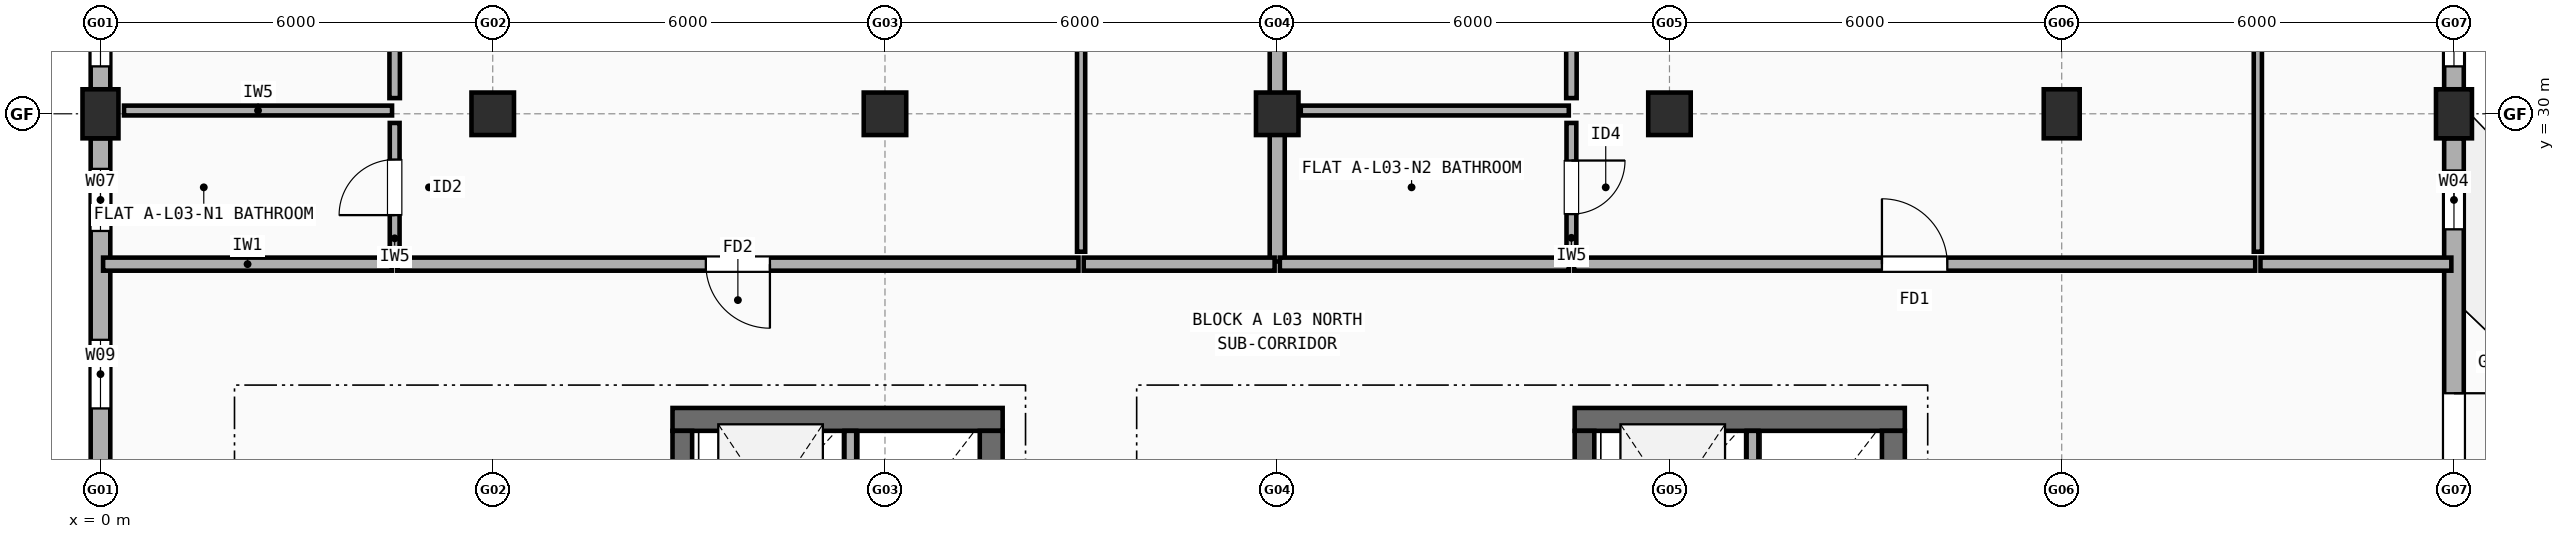
"""IFC4 building model, lengths in metres.
Left out: names, types, materials, properties, quantities, classifications, styles, units other than length and angle.
Written with IfcOpenShell. Run it as: python <this file> out.ifc"""

import sys

from ifc_helpers import new_model, si_unit, direction, frame, frame_2d, origin, origin_2d, place, context, subcontext, project, spatial, rectangle, extrude, element, fill, save


model = new_model("IFC4")
c1 = context("Model", 3, precision=1e-05, world=origin(), true_north=direction((0.0, 1.0)))
c2 = subcontext(c1, "Body", "Model", "MODEL_VIEW")
j1 = project(units=[si_unit("LENGTHUNIT", "METRE"), si_unit("PLANEANGLEUNIT", "RADIAN")], contexts=[c1])
p1 = place(None, origin())
s1 = spatial("IfcSite", under=j1, at=p1, CompositionType="ELEMENT")
p2 = place(p1, origin())
s2 = spatial("IfcBuilding", under=s1, at=p2, CompositionType="ELEMENT")
p3 = place(p2, frame((0.0, 0.0, 10.9)))
s3 = spatial("IfcBuildingStorey", under=s2, at=p3, CompositionType="ELEMENT", Elevation=10.9)
p4 = place(p3, frame((0.0, 30.0, 0.0), z_axis=(0.0, 0.0, 1.0), x_axis=(1.0, 0.0, 0.0)))
e1 = element("IfcColumn", 1, at=p4, inside=s3, PredefinedType="COLUMN", context=c2, shape_type="SweptSolid", body=[
    extrude(rectangle(XDim=0.55, YDim=0.75, at=origin_2d()), origin(), (0.0, 0.0, 1.0), 2.96),
])
for number, where, z_axis, x_axis in (
    (2, (6.0, 30.0, 0.0), (0.0, 0.0, 1.0), (1.0, 0.0, 0.0)),
    (3, (12.0, 30.0, 0.0), (0.0, 0.0, 1.0), (1.0, 0.0, 0.0)),
    (4, (18.0, 30.0, 0.0), (0.0, 0.0, 1.0), (1.0, 0.0, 0.0)),
    (5, (24.0, 30.0, 0.0), (0.0, 0.0, 1.0), (1.0, 0.0, 0.0)),
):
    element("IfcColumn", number, at=place(p3, frame(where, z_axis=z_axis, x_axis=x_axis)), inside=s3, PredefinedType="COLUMN", context=c2, shape_type="SweptSolid", body=[
        extrude(rectangle(XDim=0.65, YDim=0.65, at=origin_2d()), origin(), (0.0, 0.0, 1.0), 2.96),
    ])
for number, where, z_axis, x_axis in (
    (6, (30.0, 30.0, 0.0), (0.0, 0.0, 1.0), (1.0, 0.0, 0.0)),
    (7, (36.0, 30.0, 0.0), (0.0, 0.0, 1.0), (1.0, 0.0, 0.0)),
):
    element("IfcColumn", number, at=place(p3, frame(where, z_axis=z_axis, x_axis=x_axis)), inside=s3, PredefinedType="COLUMN", context=c2, shape_type="SweptSolid", body=[
        extrude(rectangle(XDim=0.55, YDim=0.75, at=origin_2d()), origin(), (0.0, 0.0, 1.0), 2.96),
    ])
p5 = place(p3, frame((36.0, 24.375, 0.0), z_axis=(0.0, 0.0, 1.0), x_axis=(0.0, 1.0, 0.0)))
e8 = element("IfcWall", 8, at=p5, inside=s3, PredefinedType="STANDARD", context=c2, shape_type="SweptSolid", body=[
    extrude(rectangle(XDim=5.25, YDim=0.3, at=frame_2d((2.625, 0.0))), origin(), (0.0, 0.0, 1.0), 2.442),
])
p6 = place(p5, frame((0.2, 0.0, 0.0)))
e9 = element("IfcOpeningElement", 9, at=p6, cuts=e8, PredefinedType="OPENING", context=c2, shape_type="SweptSolid", body=[
    extrude(rectangle(XDim=1.15, YDim=2.15, at=frame_2d((0.575, 1.075))), frame((0.0, 0.16, 0.0), z_axis=(0.0, -1.0, 0.0), x_axis=(1.0, 0.0, 0.0)), (0.0, 0.0, 1.0), 0.32),
])
p7 = place(p5, frame((3.857, 0.0, 0.9)))
e10 = element("IfcOpeningElement", 10, at=p7, cuts=e8, PredefinedType="OPENING", context=c2, shape_type="SweptSolid", body=[
    extrude(rectangle(XDim=0.9, YDim=1.3, at=frame_2d((0.45, 0.65))), frame((0.0, 0.16, 0.0), z_axis=(0.0, -1.0, 0.0), x_axis=(1.0, 0.0, 0.0)), (0.0, 0.0, 1.0), 0.32),
])
p8 = place(p3, frame((36.0, 30.375, 0.0), z_axis=(0.0, 0.0, 1.0), x_axis=(0.0, 1.0, 0.0)))
e11 = element("IfcWall", 11, at=p8, inside=s3, PredefinedType="STANDARD", context=c2, shape_type="SweptSolid", body=[
    extrude(rectangle(XDim=5.25, YDim=0.3, at=frame_2d((2.625, 0.0))), origin(), (0.0, 0.0, 1.0), 2.442),
])
p9 = place(p8, frame((0.35, 0.0, 0.9)))
e12 = element("IfcOpeningElement", 12, at=p9, cuts=e11, PredefinedType="OPENING", context=c2, shape_type="SweptSolid", body=[
    extrude(rectangle(XDim=0.95, YDim=1.35, at=frame_2d((0.475, 0.675))), frame((0.0, 0.16, 0.0), z_axis=(0.0, -1.0, 0.0), x_axis=(1.0, 0.0, 0.0)), (0.0, 0.0, 1.0), 0.32),
])
p10 = place(p8, frame((3.95, 0.0, 0.9)))
e13 = element("IfcOpeningElement", 13, at=p10, cuts=e11, PredefinedType="OPENING", context=c2, shape_type="SweptSolid", body=[
    extrude(rectangle(XDim=0.95, YDim=1.35, at=frame_2d((0.475, 0.675))), frame((0.0, 0.16, 0.0), z_axis=(0.0, -1.0, 0.0), x_axis=(1.0, 0.0, 0.0)), (0.0, 0.0, 1.0), 0.32),
])
p11 = place(p3, frame((0.0, 35.625, 0.0), z_axis=(0.0, 0.0, 1.0), x_axis=(0.0, -1.0, 0.0)))
e14 = element("IfcWall", 14, at=p11, inside=s3, PredefinedType="STANDARD", context=c2, shape_type="SweptSolid", body=[
    extrude(rectangle(XDim=5.25, YDim=0.3, at=frame_2d((2.625, 0.0))), origin(), (0.0, 0.0, 1.0), 2.442),
])
p12 = place(p11, frame((0.35, 0.0, 0.9)))
e15 = element("IfcOpeningElement", 15, at=p12, cuts=e14, PredefinedType="OPENING", context=c2, shape_type="SweptSolid", body=[
    extrude(rectangle(XDim=0.85, YDim=1.25, at=frame_2d((0.425, 0.625))), frame((0.0, 0.16, 0.0), z_axis=(0.0, -1.0, 0.0), x_axis=(1.0, 0.0, 0.0)), (0.0, 0.0, 1.0), 0.32),
])
p13 = place(p11, frame((4.05, 0.0, 0.9)))
e16 = element("IfcOpeningElement", 16, at=p13, cuts=e14, PredefinedType="OPENING", context=c2, shape_type="SweptSolid", body=[
    extrude(rectangle(XDim=0.85, YDim=1.25, at=frame_2d((0.425, 0.625))), frame((0.0, 0.16, 0.0), z_axis=(0.0, -1.0, 0.0), x_axis=(1.0, 0.0, 0.0)), (0.0, 0.0, 1.0), 0.32),
])
p14 = place(p3, frame((0.0, 29.625, 0.0), z_axis=(0.0, 0.0, 1.0), x_axis=(0.0, -1.0, 0.0)))
e17 = element("IfcWall", 17, at=p14, inside=s3, PredefinedType="STANDARD", context=c2, shape_type="SweptSolid", body=[
    extrude(rectangle(XDim=5.25, YDim=0.3, at=frame_2d((2.625, 0.0))), origin(), (0.0, 0.0, 1.0), 2.442),
])
p15 = place(p14, frame((0.468, 0.0, 0.9)))
e18 = element("IfcOpeningElement", 18, at=p15, cuts=e17, PredefinedType="OPENING", context=c2, shape_type="SweptSolid", body=[
    extrude(rectangle(XDim=0.95, YDim=1.35, at=frame_2d((0.475, 0.675))), frame((0.0, 0.16, 0.0), z_axis=(0.0, -1.0, 0.0), x_axis=(1.0, 0.0, 0.0)), (0.0, 0.0, 1.0), 0.32),
])
p16 = place(p14, frame((3.083, 0.0, 0.9)))
e19 = element("IfcOpeningElement", 19, at=p16, cuts=e17, PredefinedType="OPENING", context=c2, shape_type="SweptSolid", body=[
    extrude(rectangle(XDim=1.05, YDim=1.35, at=frame_2d((0.525, 0.675))), frame((0.0, 0.16, 0.0), z_axis=(0.0, -1.0, 0.0), x_axis=(1.0, 0.0, 0.0)), (0.0, 0.0, 1.0), 0.32),
])
p17 = place(p3, frame((13.8, 25.325, 0.0), z_axis=(0.0, 0.0, 1.0), x_axis=(-1.0, 0.0, 0.0)))
e20 = element("IfcWall", 20, at=p17, inside=s3, PredefinedType="SHEAR", context=c2, shape_type="SweptSolid", body=[
    extrude(rectangle(XDim=5.05, YDim=0.35, at=frame_2d((2.525, 0.0))), origin(), (0.0, 0.0, 1.0), 2.96),
])
p18 = place(p3, frame((13.625, 18.75, 0.0), z_axis=(0.0, 0.0, 1.0), x_axis=(0.0, 1.0, 0.0)))
e21 = element("IfcWall", 21, at=p18, inside=s3, PredefinedType="SHEAR", context=c2, shape_type="SweptSolid", body=[
    extrude(rectangle(XDim=6.4, YDim=0.35, at=frame_2d((3.2, 0.0))), origin(), (0.0, 0.0, 1.0), 2.96),
])
p19 = place(p3, frame((8.9, 21.8, 0.0), z_axis=(0.0, 0.0, 1.0), x_axis=(0.0, 1.0, 0.0)))
e22 = element("IfcWall", 22, at=p19, inside=s3, PredefinedType="SHEAR", context=c2, shape_type="SweptSolid", body=[
    extrude(rectangle(XDim=3.35, YDim=0.3, at=frame_2d((1.675, 0.0))), origin(), (0.0, 0.0, 1.0), 2.96),
])
p20 = place(p3, frame((11.47, 22.94, 0.0), z_axis=(0.0, 0.0, 1.0), x_axis=(0.0, 1.0, 0.0)))
e23 = element("IfcWall", 23, at=p20, inside=s3, PredefinedType="SOLIDWALL", context=c2, shape_type="SweptSolid", body=[
    extrude(rectangle(XDim=2.21, YDim=0.18, at=frame_2d((1.105, 0.0))), origin(), (0.0, 0.0, 1.0), 2.96),
])
p21 = place(p3, frame((27.6, 25.325, 0.0), z_axis=(0.0, 0.0, 1.0), x_axis=(-1.0, 0.0, 0.0)))
e24 = element("IfcWall", 24, at=p21, inside=s3, PredefinedType="SHEAR", context=c2, shape_type="SweptSolid", body=[
    extrude(rectangle(XDim=5.05, YDim=0.35, at=frame_2d((2.525, 0.0))), origin(), (0.0, 0.0, 1.0), 2.96),
])
p22 = place(p3, frame((27.425, 18.75, 0.0), z_axis=(0.0, 0.0, 1.0), x_axis=(0.0, 1.0, 0.0)))
e25 = element("IfcWall", 25, at=p22, inside=s3, PredefinedType="SHEAR", context=c2, shape_type="SweptSolid", body=[
    extrude(rectangle(XDim=6.4, YDim=0.35, at=frame_2d((3.2, 0.0))), origin(), (0.0, 0.0, 1.0), 2.96),
])
p23 = place(p3, frame((22.7, 21.8, 0.0), z_axis=(0.0, 0.0, 1.0), x_axis=(0.0, 1.0, 0.0)))
e26 = element("IfcWall", 26, at=p23, inside=s3, PredefinedType="SHEAR", context=c2, shape_type="SweptSolid", body=[
    extrude(rectangle(XDim=3.35, YDim=0.3, at=frame_2d((1.675, 0.0))), origin(), (0.0, 0.0, 1.0), 2.96),
])
p24 = place(p3, frame((25.27, 22.94, 0.0), z_axis=(0.0, 0.0, 1.0), x_axis=(0.0, 1.0, 0.0)))
e27 = element("IfcWall", 27, at=p24, inside=s3, PredefinedType="SOLIDWALL", context=c2, shape_type="SweptSolid", body=[
    extrude(rectangle(XDim=2.21, YDim=0.18, at=frame_2d((1.105, 0.0))), origin(), (0.0, 0.0, 1.0), 2.96),
])
p25 = place(p3, frame((18.0, 27.74, 0.0), z_axis=(0.0, 0.0, 1.0), x_axis=(0.0, 1.0, 0.0)))
e28 = element("IfcWall", 28, at=p25, inside=s3, PredefinedType="SOLIDWALL", context=c2, shape_type="SweptSolid", body=[
    extrude(rectangle(XDim=13.87, YDim=0.23, at=frame_2d((6.935, 0.0))), origin(), (0.0, 0.0, 1.0), 2.458),
])
p26 = place(p3, frame((0.04, 27.7, 0.0), z_axis=(0.0, 0.0, 1.0), x_axis=(1.0, 0.0, 0.0)))
e29 = element("IfcWall", 29, at=p26, inside=s3, PredefinedType="SOLIDWALL", context=c2, shape_type="SweptSolid", body=[
    extrude(rectangle(XDim=4.42, YDim=0.2, at=frame_2d((2.21, 0.0))), origin(), (0.0, 0.0, 1.0), 2.442),
])
p27 = place(p3, frame((4.54, 27.7, 0.0), z_axis=(0.0, 0.0, 1.0), x_axis=(1.0, 0.0, 0.0)))
e30 = element("IfcWall", 30, at=p27, inside=s3, PredefinedType="SOLIDWALL", context=c2, shape_type="SweptSolid", body=[
    extrude(rectangle(XDim=10.42, YDim=0.2, at=frame_2d((5.21, 0.0))), origin(), (0.0, 0.0, 1.0), 2.508),
])
p28 = place(p27, frame((4.72, 0.0, 0.0)))
e31 = element("IfcOpeningElement", 31, at=p28, cuts=e30, PredefinedType="OPENING", context=c2, shape_type="SweptSolid", body=[
    extrude(rectangle(XDim=0.98, YDim=2.15, at=frame_2d((0.49, 1.075))), frame((0.0, 0.11, 0.0), z_axis=(0.0, -1.0, 0.0), x_axis=(1.0, 0.0, 0.0)), (0.0, 0.0, 1.0), 0.22),
])
p29 = place(p3, frame((4.5, 30.24, 0.0), z_axis=(0.0, 0.0, 1.0), x_axis=(0.0, 1.0, 0.0)))
e32 = element("IfcWall", 32, at=p29, inside=s3, PredefinedType="PLUMBINGWALL", context=c2, shape_type="SweptSolid", body=[
    extrude(rectangle(XDim=7.37, YDim=0.16, at=frame_2d((3.685, 0.0))), origin(), (0.0, 0.0, 1.0), 2.442),
])
p30 = place(p29, frame((3.235, 0.0, 0.0)))
e33 = element("IfcOpeningElement", 33, at=p30, cuts=e32, PredefinedType="OPENING", context=c2, shape_type="SweptSolid", body=[
    extrude(rectangle(XDim=0.9, YDim=2.1, at=frame_2d((0.45, 1.05))), frame((0.0, 0.09, 0.0), z_axis=(0.0, -1.0, 0.0), x_axis=(1.0, 0.0, 0.0)), (0.0, 0.0, 1.0), 0.18),
])
p31 = place(p3, frame((4.5, 27.89, 0.0), z_axis=(0.0, 0.0, 1.0), x_axis=(0.0, 1.0, 0.0)))
e34 = element("IfcWall", 34, at=p31, inside=s3, PredefinedType="PARTITIONING", context=c2, shape_type="SweptSolid", body=[
    extrude(rectangle(XDim=1.97, YDim=0.15, at=frame_2d((0.985, 0.0))), origin(), (0.0, 0.0, 1.0), 2.96),
])
p32 = place(p31, frame((0.56, 0.0, 0.0)))
e35 = element("IfcOpeningElement", 35, at=p32, cuts=e34, PredefinedType="OPENING", context=c2, shape_type="SweptSolid", body=[
    extrude(rectangle(XDim=0.85, YDim=2.1, at=frame_2d((0.425, 1.05))), frame((0.0, 0.085, 0.0), z_axis=(0.0, -1.0, 0.0), x_axis=(1.0, 0.0, 0.0)), (0.0, 0.0, 1.0), 0.17),
])
p33 = place(p3, frame((0.36, 30.05, 0.0), z_axis=(0.0, 0.0, 1.0), x_axis=(1.0, 0.0, 0.0)))
e36 = element("IfcWall", 36, at=p33, inside=s3, PredefinedType="PARTITIONING", context=c2, shape_type="SweptSolid", body=[
    extrude(rectangle(XDim=4.1, YDim=0.15, at=frame_2d((2.05, 0.0))), origin(), (0.0, 0.0, 1.0), 2.442),
])
p34 = place(p3, frame((15.04, 27.7, 0.0), z_axis=(0.0, 0.0, 1.0), x_axis=(1.0, 0.0, 0.0)))
e37 = element("IfcWall", 37, at=p34, inside=s3, PredefinedType="SOLIDWALL", context=c2, shape_type="SweptSolid", body=[
    extrude(rectangle(XDim=2.92, YDim=0.2, at=frame_2d((1.46, 0.0))), origin(), (0.0, 0.0, 1.0), 2.96),
])
p35 = place(p3, frame((15.0, 27.89, 0.0), z_axis=(0.0, 0.0, 1.0), x_axis=(0.0, 1.0, 0.0)))
e38 = element("IfcWall", 38, at=p35, inside=s3, PredefinedType="PARTITIONING", context=c2, shape_type="SweptSolid", body=[
    extrude(rectangle(XDim=13.92, YDim=0.125, at=frame_2d((6.96, 0.0))), origin(), (0.0, 0.0, 1.0), 2.442),
])
p36 = place(p35, frame((6.65, 0.0, 0.0)))
e39 = element("IfcOpeningElement", 39, at=p36, cuts=e38, PredefinedType="OPENING", context=c2, shape_type="SweptSolid", body=[
    extrude(rectangle(XDim=0.9, YDim=2.1, at=frame_2d((0.45, 1.05))), frame((0.0, 0.073, 0.0), z_axis=(0.0, -1.0, 0.0), x_axis=(1.0, 0.0, 0.0)), (0.0, 0.0, 1.0), 0.145),
])
p37 = place(p3, frame((18.04, 27.7, 0.0), z_axis=(0.0, 0.0, 1.0), x_axis=(1.0, 0.0, 0.0)))
e40 = element("IfcWall", 40, at=p37, inside=s3, PredefinedType="SOLIDWALL", context=c2, shape_type="SweptSolid", body=[
    extrude(rectangle(XDim=4.42, YDim=0.2, at=frame_2d((2.21, 0.0))), origin(), (0.0, 0.0, 1.0), 2.96),
])
p38 = place(p3, frame((22.54, 27.7, 0.0), z_axis=(0.0, 0.0, 1.0), x_axis=(1.0, 0.0, 0.0)))
e41 = element("IfcWall", 41, at=p38, inside=s3, PredefinedType="SOLIDWALL", context=c2, shape_type="SweptSolid", body=[
    extrude(rectangle(XDim=10.42, YDim=0.2, at=frame_2d((5.21, 0.0))), origin(), (0.0, 0.0, 1.0), 2.442),
])
p39 = place(p38, frame((4.71, 0.0, 0.0)))
e42 = element("IfcOpeningElement", 42, at=p39, cuts=e41, PredefinedType="OPENING", context=c2, shape_type="SweptSolid", body=[
    extrude(rectangle(XDim=1.0, YDim=2.15, at=frame_2d((0.5, 1.075))), frame((0.0, 0.11, 0.0), z_axis=(0.0, -1.0, 0.0), x_axis=(1.0, 0.0, 0.0)), (0.0, 0.0, 1.0), 0.22),
])
p40 = place(p3, frame((22.5, 30.24, 0.0), z_axis=(0.0, 0.0, 1.0), x_axis=(0.0, 1.0, 0.0)))
e43 = element("IfcWall", 43, at=p40, inside=s3, PredefinedType="PLUMBINGWALL", context=c2, shape_type="SweptSolid", body=[
    extrude(rectangle(XDim=7.37, YDim=0.16, at=frame_2d((3.685, 0.0))), origin(), (0.0, 0.0, 1.0), 2.442),
])
p41 = place(p40, frame((3.245, 0.0, 0.0)))
e44 = element("IfcOpeningElement", 44, at=p41, cuts=e43, PredefinedType="OPENING", context=c2, shape_type="SweptSolid", body=[
    extrude(rectangle(XDim=0.88, YDim=2.1, at=frame_2d((0.44, 1.05))), frame((0.0, 0.09, 0.0), z_axis=(0.0, -1.0, 0.0), x_axis=(1.0, 0.0, 0.0)), (0.0, 0.0, 1.0), 0.18),
])
p42 = place(p3, frame((22.5, 27.89, 0.0), z_axis=(0.0, 0.0, 1.0), x_axis=(0.0, 1.0, 0.0)))
e45 = element("IfcWall", 45, at=p42, inside=s3, PredefinedType="PARTITIONING", context=c2, shape_type="SweptSolid", body=[
    extrude(rectangle(XDim=1.97, YDim=0.15, at=frame_2d((0.985, 0.0))), origin(), (0.0, 0.0, 1.0), 2.96),
])
p43 = place(p42, frame((0.575, 0.0, 0.0)))
e46 = element("IfcOpeningElement", 46, at=p43, cuts=e45, PredefinedType="OPENING", context=c2, shape_type="SweptSolid", body=[
    extrude(rectangle(XDim=0.82, YDim=2.08, at=frame_2d((0.41, 1.04))), frame((0.0, 0.085, 0.0), z_axis=(0.0, -1.0, 0.0), x_axis=(1.0, 0.0, 0.0)), (0.0, 0.0, 1.0), 0.17),
])
p44 = place(p3, frame((18.36, 30.05, 0.0), z_axis=(0.0, 0.0, 1.0), x_axis=(1.0, 0.0, 0.0)))
e47 = element("IfcWall", 47, at=p44, inside=s3, PredefinedType="PARTITIONING", context=c2, shape_type="SweptSolid", body=[
    extrude(rectangle(XDim=4.1, YDim=0.15, at=frame_2d((2.05, 0.0))), origin(), (0.0, 0.0, 1.0), 2.442),
])
p45 = place(p3, frame((33.04, 27.7, 0.0), z_axis=(0.0, 0.0, 1.0), x_axis=(1.0, 0.0, 0.0)))
e48 = element("IfcWall", 48, at=p45, inside=s3, PredefinedType="SOLIDWALL", context=c2, shape_type="SweptSolid", body=[
    extrude(rectangle(XDim=2.92, YDim=0.2, at=frame_2d((1.46, 0.0))), origin(), (0.0, 0.0, 1.0), 2.442),
])
p46 = place(p3, frame((33.0, 27.89, 0.0), z_axis=(0.0, 0.0, 1.0), x_axis=(0.0, 1.0, 0.0)))
e49 = element("IfcWall", 49, at=p46, inside=s3, PredefinedType="PARTITIONING", context=c2, shape_type="SweptSolid", body=[
    extrude(rectangle(XDim=13.92, YDim=0.125, at=frame_2d((6.96, 0.0))), origin(), (0.0, 0.0, 1.0), 2.442),
])
p47 = place(p46, frame((6.65, 0.0, 0.0)))
e50 = element("IfcOpeningElement", 50, at=p47, cuts=e49, PredefinedType="OPENING", context=c2, shape_type="SweptSolid", body=[
    extrude(rectangle(XDim=0.88, YDim=2.1, at=frame_2d((0.44, 1.05))), frame((0.0, 0.073, 0.0), z_axis=(0.0, -1.0, 0.0), x_axis=(1.0, 0.0, 0.0)), (0.0, 0.0, 1.0), 0.145),
])
p48 = place(p6, frame((1.15, 0.0, 0.0), z_axis=(0.0, 0.0, 1.0), x_axis=(-1.0, 0.0, 0.0)))
e51 = element("IfcDoor", 51, at=p48, inside=s3, OperationType="SINGLE_SWING_RIGHT", PredefinedType="DOOR", context=c2, shape_type="SweptSolid", body=[
    extrude(rectangle(XDim=1.15, YDim=2.15, at=frame_2d((0.575, 1.075))), frame((0.0, 0.025, 0.0), z_axis=(0.0, -1.0, 0.0), x_axis=(1.0, 0.0, 0.0)), (0.0, 0.0, 1.0), 0.05),
])
fill(e9, e51)
p49 = place(p7, origin())
e52 = element("IfcWindow", 52, at=p49, inside=s3, PartitioningType="SINGLE_PANEL", PredefinedType="WINDOW", context=c2, shape_type="SweptSolid", body=[
    extrude(rectangle(XDim=0.9, YDim=1.3, at=frame_2d((0.45, 0.65))), frame((0.0, 0.03, 0.0), z_axis=(0.0, -1.0, 0.0), x_axis=(1.0, 0.0, 0.0)), (0.0, 0.0, 1.0), 0.06),
])
fill(e10, e52)
p50 = place(p9, origin())
e53 = element("IfcWindow", 53, at=p50, inside=s3, PartitioningType="SINGLE_PANEL", PredefinedType="WINDOW", context=c2, shape_type="SweptSolid", body=[
    extrude(rectangle(XDim=0.95, YDim=1.35, at=frame_2d((0.475, 0.675))), frame((0.0, 0.03, 0.0), z_axis=(0.0, -1.0, 0.0), x_axis=(1.0, 0.0, 0.0)), (0.0, 0.0, 1.0), 0.06),
])
fill(e12, e53)
p51 = place(p13, origin())
e54 = element("IfcWindow", 54, at=p51, inside=s3, PartitioningType="SINGLE_PANEL", PredefinedType="WINDOW", context=c2, shape_type="SweptSolid", body=[
    extrude(rectangle(XDim=0.85, YDim=1.25, at=frame_2d((0.425, 0.625))), frame((0.0, 0.03, 0.0), z_axis=(0.0, -1.0, 0.0), x_axis=(1.0, 0.0, 0.0)), (0.0, 0.0, 1.0), 0.06),
])
fill(e16, e54)
p52 = place(p15, origin())
e55 = element("IfcWindow", 55, at=p52, inside=s3, PartitioningType="SINGLE_PANEL", PredefinedType="WINDOW", context=c2, shape_type="SweptSolid", body=[
    extrude(rectangle(XDim=0.95, YDim=1.35, at=frame_2d((0.475, 0.675))), frame((0.0, 0.03, 0.0), z_axis=(0.0, -1.0, 0.0), x_axis=(1.0, 0.0, 0.0)), (0.0, 0.0, 1.0), 0.06),
])
fill(e18, e55)
p53 = place(p16, origin())
e56 = element("IfcWindow", 56, at=p53, inside=s3, PartitioningType="SINGLE_PANEL", PredefinedType="WINDOW", context=c2, shape_type="SweptSolid", body=[
    extrude(rectangle(XDim=1.05, YDim=1.35, at=frame_2d((0.525, 0.675))), frame((0.0, 0.03, 0.0), z_axis=(0.0, -1.0, 0.0), x_axis=(1.0, 0.0, 0.0)), (0.0, 0.0, 1.0), 0.06),
])
fill(e19, e56)
p54 = place(p28, origin())
e57 = element("IfcDoor", 57, at=p54, inside=s3, OperationType="SINGLE_SWING_RIGHT", PredefinedType="DOOR", context=c2, shape_type="SweptSolid", body=[
    extrude(rectangle(XDim=0.98, YDim=2.15, at=frame_2d((0.49, 1.075))), frame((0.0, 0.025, 0.0), z_axis=(0.0, -1.0, 0.0), x_axis=(1.0, 0.0, 0.0)), (0.0, 0.0, 1.0), 0.05),
])
fill(e31, e57)
p55 = place(p32, origin())
e58 = element("IfcDoor", 58, at=p55, inside=s3, OperationType="SINGLE_SWING_LEFT", PredefinedType="DOOR", context=c2, shape_type="SweptSolid", body=[
    extrude(rectangle(XDim=0.85, YDim=2.1, at=frame_2d((0.425, 1.05))), frame((0.0, 0.025, 0.0), z_axis=(0.0, -1.0, 0.0), x_axis=(1.0, 0.0, 0.0)), (0.0, 0.0, 1.0), 0.05),
])
fill(e35, e58)
p56 = place(p39, origin())
e59 = element("IfcDoor", 59, at=p56, inside=s3, OperationType="SINGLE_SWING_LEFT", PredefinedType="DOOR", context=c2, shape_type="SweptSolid", body=[
    extrude(rectangle(XDim=1.0, YDim=2.15, at=frame_2d((0.5, 1.075))), frame((0.0, 0.025, 0.0), z_axis=(0.0, -1.0, 0.0), x_axis=(1.0, 0.0, 0.0)), (0.0, 0.0, 1.0), 0.05),
])
fill(e42, e59)
p57 = place(p43, origin())
e60 = element("IfcDoor", 60, at=p57, inside=s3, OperationType="SINGLE_SWING_RIGHT", PredefinedType="DOOR", context=c2, shape_type="SweptSolid", body=[
    extrude(rectangle(XDim=0.82, YDim=2.08, at=frame_2d((0.41, 1.04))), frame((0.0, 0.025, 0.0), z_axis=(0.0, -1.0, 0.0), x_axis=(1.0, 0.0, 0.0)), (0.0, 0.0, 1.0), 0.05),
])
fill(e46, e60)
save(model, sys.argv[1])
